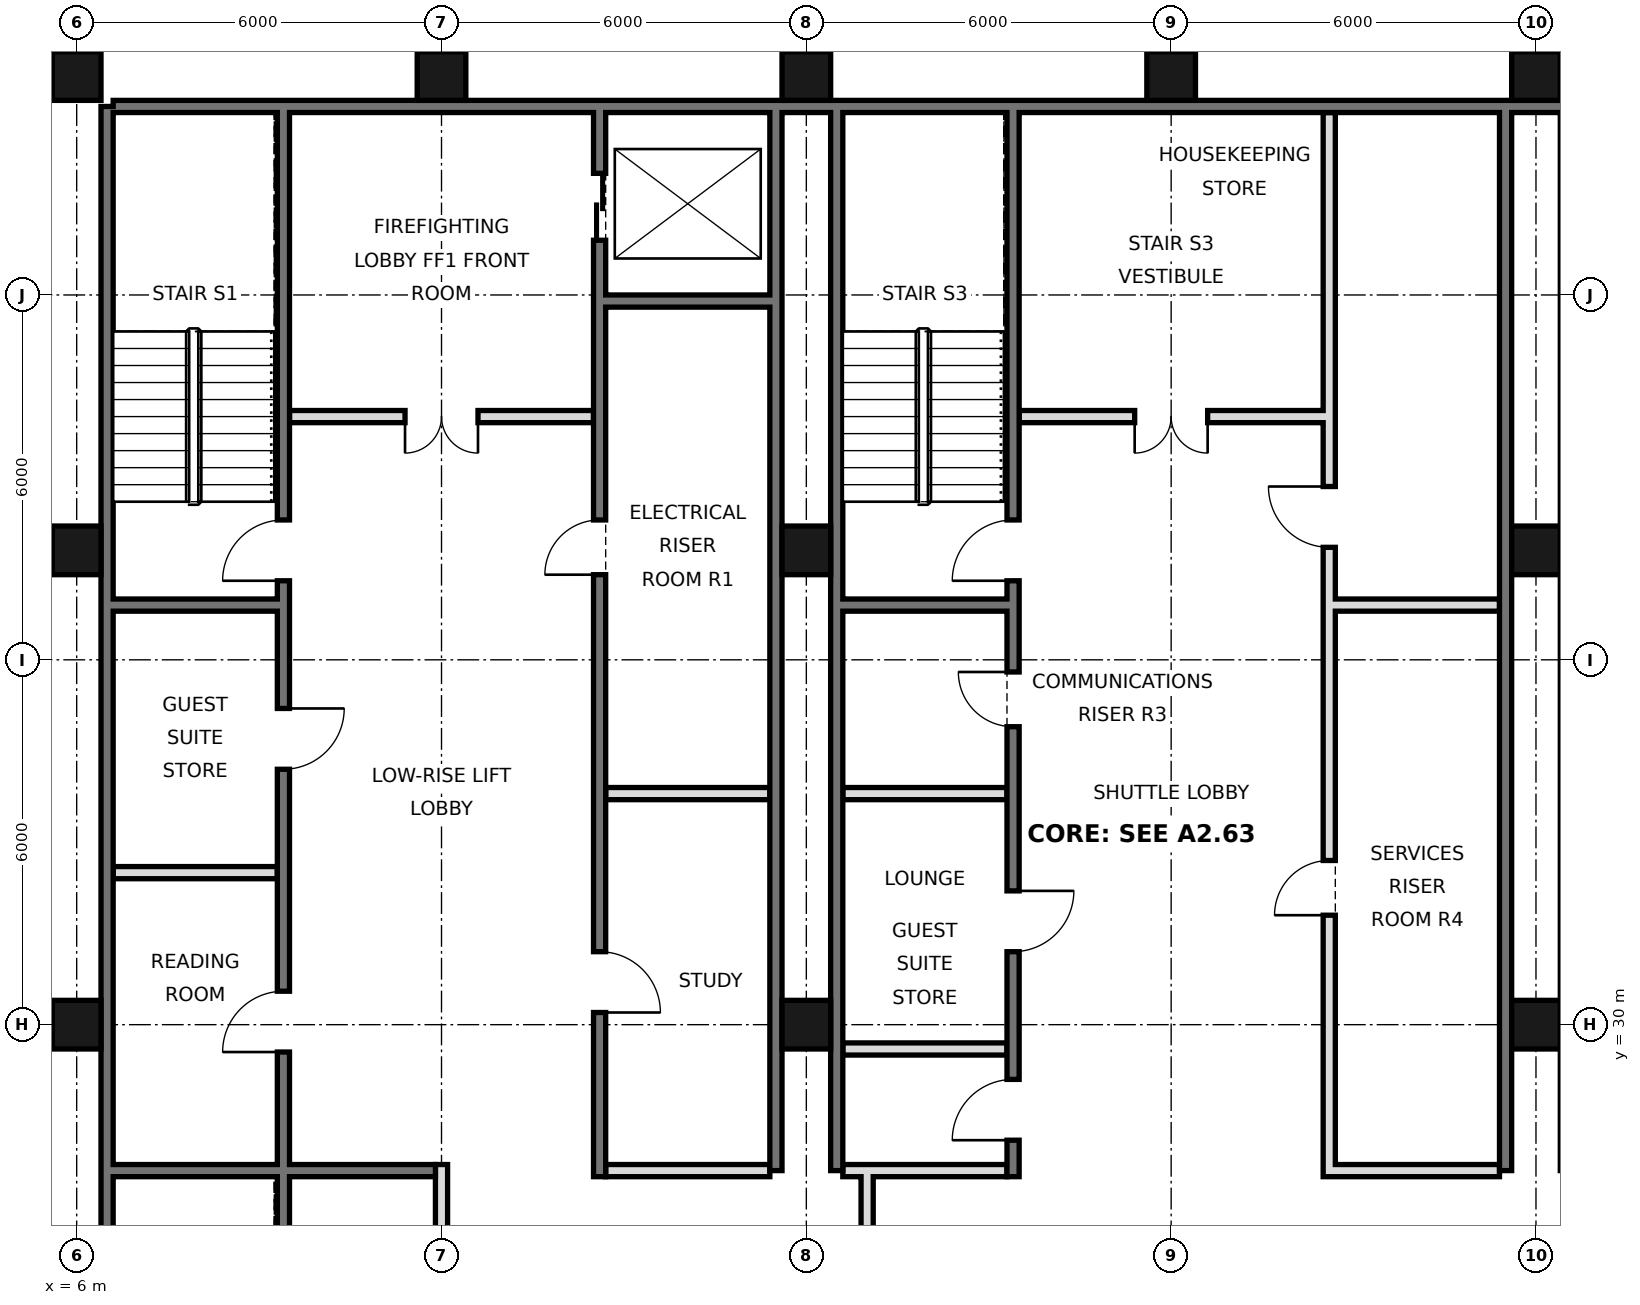
"""IFC4 building model, lengths in metres.
Left out: names, types, materials, properties, quantities, classifications, styles, units other than length and angle.
Written with IfcOpenShell. Run it as: python <this file> out.ifc"""

import sys

from ifc_helpers import new_model, si_unit, direction, frame, frame_2d, origin, origin_2d, place, context, subcontext, project, spatial, rectangle, hollow_rectangle, extrude, element, fill, save


model = new_model("IFC4")
c1 = context("Model", 3, precision=1e-05, world=origin(), true_north=direction((0.0, 1.0)))
c2 = subcontext(c1, "Body", "Model", "MODEL_VIEW")
j1 = project(units=[si_unit("LENGTHUNIT", "METRE"), si_unit("PLANEANGLEUNIT", "RADIAN")], contexts=[c1])
p1 = place(None, origin())
s1 = spatial("IfcSite", under=j1, at=p1, CompositionType="ELEMENT")
p2 = place(p1, origin())
s2 = spatial("IfcBuilding", under=s1, at=p2, CompositionType="ELEMENT")
p3 = place(p2, frame((0.0, 0.0, 250.4)))
s3 = spatial("IfcBuildingStorey", under=s2, at=p3, CompositionType="ELEMENT", Elevation=250.4)
for number, where, z_axis, x_axis in (
    (1, (6.0, 30.0, 0.0), (0.0, 0.0, 1.0), (1.0, 0.0, 0.0)),
    (2, (6.0, 37.8, 0.0), (0.0, 0.0, 1.0), (1.0, 0.0, 0.0)),
    (3, (6.0, 45.6, 0.0), (0.0, 0.0, 1.0), (1.0, 0.0, 0.0)),
    (4, (12.0, 45.6, 0.0), (0.0, 0.0, 1.0), (1.0, 0.0, 0.0)),
    (5, (18.0, 30.0, 0.0), (0.0, 0.0, 1.0), (1.0, 0.0, 0.0)),
    (6, (18.0, 37.8, 0.0), (0.0, 0.0, 1.0), (1.0, 0.0, 0.0)),
    (7, (18.0, 45.6, 0.0), (0.0, 0.0, 1.0), (1.0, 0.0, 0.0)),
    (8, (24.0, 45.6, 0.0), (0.0, 0.0, 1.0), (1.0, 0.0, 0.0)),
    (9, (30.0, 30.0, 0.0), (0.0, 0.0, 1.0), (1.0, 0.0, 0.0)),
    (10, (30.0, 37.8, 0.0), (0.0, 0.0, 1.0), (1.0, 0.0, 0.0)),
    (11, (30.0, 45.6, 0.0), (0.0, 0.0, 1.0), (1.0, 0.0, 0.0)),
):
    element("IfcColumn", number, at=place(p3, frame(where, z_axis=z_axis, x_axis=x_axis)), inside=s3, PredefinedType="COLUMN", context=c2, shape_type="SweptSolid", body=[
        extrude(hollow_rectangle(XDim=0.8, YDim=0.8, WallThickness=0.032, at=origin_2d()), origin(), (0.0, 0.0, 1.0), 3.6),
    ])
p4 = place(p3, frame((6.5, 21.6, 0.0), z_axis=(0.0, 0.0, 1.0), x_axis=(0.0, 1.0, 0.0)))
e12 = element("IfcWall", 12, at=p4, inside=s3, PredefinedType="SOLIDWALL", context=c2, shape_type="SweptSolid", body=[
    extrude(rectangle(XDim=23.5, YDim=0.2, at=frame_2d((11.75, 0.0))), origin(), (0.0, 0.0, 1.0), 3.42),
])
p5 = place(p3, frame((6.6, 45.1, 0.0), z_axis=(0.0, 0.0, 1.0), x_axis=(1.0, 0.0, 0.0)))
e13 = element("IfcWall", 13, at=p5, inside=s3, PredefinedType="SOLIDWALL", context=c2, shape_type="SweptSolid", body=[
    extrude(rectangle(XDim=34.8, YDim=0.2, at=frame_2d((17.4, 0.0))), origin(), (0.0, 0.0, 1.0), 3.42),
])
for number, where, z_axis, x_axis in (
    (14, (17.5, 27.6, 0.0), (0.0, 0.0, 1.0), (0.0, 1.0, 0.0)),
    (15, (18.5, 27.6, 0.0), (0.0, 0.0, 1.0), (0.0, 1.0, 0.0)),
    (16, (29.5, 27.6, 0.0), (0.0, 0.0, 1.0), (0.0, 1.0, 0.0)),
):
    element("IfcWall", number, at=place(p3, frame(where, z_axis=z_axis, x_axis=x_axis)), inside=s3, PredefinedType="SOLIDWALL", context=c2, shape_type="SweptSolid", body=[
        extrude(rectangle(XDim=17.5, YDim=0.2, at=frame_2d((8.75, 0.0))), origin(), (0.0, 0.0, 1.0), 3.42),
    ])
p6 = place(p3, frame((19.0, 21.6, 0.0), z_axis=(0.0, 0.0, 1.0), x_axis=(0.0, 1.0, 0.0)))
e17 = element("IfcWall", 17, at=p6, inside=s3, PredefinedType="PARTITIONING", context=c2, shape_type="SweptSolid", body=[
    extrude(rectangle(XDim=6.0, YDim=0.2, at=frame_2d((3.0, 0.0))), origin(), (0.0, 0.0, 1.0), 3.42),
])
p7 = place(p6, frame((2.1, 0.0, 0.0)))
e18 = element("IfcOpeningElement", 18, at=p7, cuts=e17, PredefinedType="OPENING", context=c2, shape_type="SweptSolid", body=[
    extrude(rectangle(XDim=1.8, YDim=2.1, at=frame_2d((0.9, 1.05))), frame((0.0, 0.11, 0.0), z_axis=(0.0, -1.0, 0.0), x_axis=(1.0, 0.0, 0.0)), (0.0, 0.0, 1.0), 0.22),
])
p8 = place(p3, frame((12.0, 21.6, 0.0), z_axis=(0.0, 0.0, 1.0), x_axis=(0.0, 1.0, 0.0)))
e19 = element("IfcWall", 19, at=p8, inside=s3, PredefinedType="PARTITIONING", context=c2, shape_type="SweptSolid", body=[
    extrude(rectangle(XDim=6.1, YDim=0.2, at=frame_2d((3.05, 0.0))), origin(), (0.0, 0.0, 1.0), 3.42),
])
p9 = place(p3, frame((14.6, 27.5, 0.0), z_axis=(0.0, 0.0, 1.0), x_axis=(0.0, 1.0, 0.0)))
e20 = element("IfcWall", 20, at=p9, inside=s3, PredefinedType="SOLIDWALL", context=c2, shape_type="SweptSolid", body=[
    extrude(rectangle(XDim=17.5, YDim=0.2, at=frame_2d((8.75, 0.0))), origin(), (0.0, 0.0, 1.0), 3.42),
])
p10 = place(p9, frame((15.4, 0.0, 0.0)))
e21 = element("IfcOpeningElement", 21, at=p10, cuts=e20, PredefinedType="OPENING", context=c2, shape_type="SweptSolid", body=[
    extrude(rectangle(XDim=1.1, YDim=2.1, at=frame_2d((0.55, 1.05))), frame((0.0, 0.11, 0.0), z_axis=(0.0, -1.0, 0.0), x_axis=(1.0, 0.0, 0.0)), (0.0, 0.0, 1.0), 0.22),
])
p11 = place(p9, frame((2.7, 0.0, 0.0)))
e22 = element("IfcOpeningElement", 22, at=p11, cuts=e20, PredefinedType="OPENING", context=c2, shape_type="SweptSolid", body=[
    extrude(rectangle(XDim=1.0, YDim=2.1, at=frame_2d((0.5, 1.05))), frame((0.0, 0.11, 0.0), z_axis=(0.0, -1.0, 0.0), x_axis=(1.0, 0.0, 0.0)), (0.0, 0.0, 1.0), 0.22),
])
p12 = place(p9, frame((9.9, 0.0, 0.0)))
e23 = element("IfcOpeningElement", 23, at=p12, cuts=e20, PredefinedType="OPENING", context=c2, shape_type="SweptSolid", body=[
    extrude(rectangle(XDim=0.9, YDim=2.1, at=frame_2d((0.45, 1.05))), frame((0.0, 0.11, 0.0), z_axis=(0.0, -1.0, 0.0), x_axis=(1.0, 0.0, 0.0)), (0.0, 0.0, 1.0), 0.22),
])
p13 = place(p3, frame((21.4, 27.5, 0.0), z_axis=(0.0, 0.0, 1.0), x_axis=(0.0, 1.0, 0.0)))
e24 = element("IfcWall", 24, at=p13, inside=s3, PredefinedType="SOLIDWALL", context=c2, shape_type="SweptSolid", body=[
    extrude(rectangle(XDim=17.5, YDim=0.2, at=frame_2d((8.75, 0.0))), origin(), (0.0, 0.0, 1.0), 3.42),
])
p14 = place(p13, frame((0.6, 0.0, 0.0)))
e25 = element("IfcOpeningElement", 25, at=p14, cuts=e24, PredefinedType="OPENING", context=c2, shape_type="SweptSolid", body=[
    extrude(rectangle(XDim=1.0, YDim=2.1, at=frame_2d((0.5, 1.05))), frame((0.0, 0.11, 0.0), z_axis=(0.0, -1.0, 0.0), x_axis=(1.0, 0.0, 0.0)), (0.0, 0.0, 1.0), 0.22),
])
p15 = place(p13, frame((3.7, 0.0, 0.0)))
e26 = element("IfcOpeningElement", 26, at=p15, cuts=e24, PredefinedType="OPENING", context=c2, shape_type="SweptSolid", body=[
    extrude(rectangle(XDim=1.0, YDim=2.1, at=frame_2d((0.5, 1.05))), frame((0.0, 0.11, 0.0), z_axis=(0.0, -1.0, 0.0), x_axis=(1.0, 0.0, 0.0)), (0.0, 0.0, 1.0), 0.22),
])
p16 = place(p13, frame((9.8, 0.0, 0.0)))
e27 = element("IfcOpeningElement", 27, at=p16, cuts=e24, PredefinedType="OPENING", context=c2, shape_type="SweptSolid", body=[
    extrude(rectangle(XDim=1.0, YDim=2.1, at=frame_2d((0.5, 1.05))), frame((0.0, 0.11, 0.0), z_axis=(0.0, -1.0, 0.0), x_axis=(1.0, 0.0, 0.0)), (0.0, 0.0, 1.0), 0.22),
])
p17 = place(p13, frame((7.4, 0.0, 0.0)))
e28 = element("IfcOpeningElement", 28, at=p17, cuts=e24, PredefinedType="OPENING", context=c2, shape_type="SweptSolid", body=[
    extrude(rectangle(XDim=0.9, YDim=2.1, at=frame_2d((0.45, 1.05))), frame((0.0, 0.11, 0.0), z_axis=(0.0, -1.0, 0.0), x_axis=(1.0, 0.0, 0.0)), (0.0, 0.0, 1.0), 0.22),
])
p18 = place(p3, frame((26.6, 27.5, 0.0), z_axis=(0.0, 0.0, 1.0), x_axis=(0.0, 1.0, 0.0)))
e29 = element("IfcWall", 29, at=p18, inside=s3, PredefinedType="SOLIDWALL", context=c2, shape_type="SweptSolid", body=[
    extrude(rectangle(XDim=17.5, YDim=0.2, at=frame_2d((8.75, 0.0))), origin(), (0.0, 0.0, 1.0), 3.42),
])
p19 = place(p18, frame((4.3, 0.0, 0.0)))
e30 = element("IfcOpeningElement", 30, at=p19, cuts=e29, PredefinedType="OPENING", context=c2, shape_type="SweptSolid", body=[
    extrude(rectangle(XDim=0.9, YDim=2.1, at=frame_2d((0.45, 1.05))), frame((0.0, 0.11, 0.0), z_axis=(0.0, -1.0, 0.0), x_axis=(1.0, 0.0, 0.0)), (0.0, 0.0, 1.0), 0.22),
])
p20 = place(p18, frame((10.35, 0.0, 0.0)))
e31 = element("IfcOpeningElement", 31, at=p20, cuts=e29, PredefinedType="OPENING", context=c2, shape_type="SweptSolid", body=[
    extrude(rectangle(XDim=1.0, YDim=2.1, at=frame_2d((0.5, 1.05))), frame((0.0, 0.11, 0.0), z_axis=(0.0, -1.0, 0.0), x_axis=(1.0, 0.0, 0.0)), (0.0, 0.0, 1.0), 0.22),
])
p21 = place(p3, frame((9.4, 21.6, 0.0), z_axis=(0.0, 0.0, 1.0), x_axis=(0.0, 1.0, 0.0)))
e32 = element("IfcWall", 32, at=p21, inside=s3, PredefinedType="SOLIDWALL", context=c2, shape_type="SweptSolid", body=[
    extrude(rectangle(XDim=23.4, YDim=0.2, at=frame_2d((11.7, 0.0))), origin(), (0.0, 0.0, 1.0), 3.42),
])
p22 = place(p21, frame((7.95, 0.0, 0.0)))
e33 = element("IfcOpeningElement", 33, at=p22, cuts=e32, PredefinedType="OPENING", context=c2, shape_type="SweptSolid", body=[
    extrude(rectangle(XDim=1.0, YDim=2.1, at=frame_2d((0.5, 1.05))), frame((0.0, 0.11, 0.0), z_axis=(0.0, -1.0, 0.0), x_axis=(1.0, 0.0, 0.0)), (0.0, 0.0, 1.0), 0.22),
])
p23 = place(p21, frame((12.6, 0.0, 0.0)))
e34 = element("IfcOpeningElement", 34, at=p23, cuts=e32, PredefinedType="OPENING", context=c2, shape_type="SweptSolid", body=[
    extrude(rectangle(XDim=1.0, YDim=2.1, at=frame_2d((0.5, 1.05))), frame((0.0, 0.11, 0.0), z_axis=(0.0, -1.0, 0.0), x_axis=(1.0, 0.0, 0.0)), (0.0, 0.0, 1.0), 0.22),
])
p24 = place(p21, frame((15.7, 0.0, 0.0)))
e35 = element("IfcOpeningElement", 35, at=p24, cuts=e32, PredefinedType="OPENING", context=c2, shape_type="SweptSolid", body=[
    extrude(rectangle(XDim=1.0, YDim=2.1, at=frame_2d((0.5, 1.05))), frame((0.0, 0.11, 0.0), z_axis=(0.0, -1.0, 0.0), x_axis=(1.0, 0.0, 0.0)), (0.0, 0.0, 1.0), 0.22),
])
p25 = place(p21, frame((0.175, 0.0, 0.0)))
e36 = element("IfcOpeningElement", 36, at=p25, cuts=e32, PredefinedType="OPENING", context=c2, shape_type="SweptSolid", body=[
    extrude(rectangle(XDim=0.9, YDim=2.1, at=frame_2d((0.45, 1.05))), frame((0.0, 0.11, 0.0), z_axis=(0.0, -1.0, 0.0), x_axis=(1.0, 0.0, 0.0)), (0.0, 0.0, 1.0), 0.22),
])
for number, where, z_axis, x_axis in (
    (37, (14.7, 27.6, 0.0), (0.0, 0.0, 1.0), (1.0, 0.0, 0.0)),
    (38, (18.6, 27.6, 0.0), (0.0, 0.0, 1.0), (1.0, 0.0, 0.0)),
):
    element("IfcWall", number, at=place(p3, frame(where, z_axis=z_axis, x_axis=x_axis)), inside=s3, PredefinedType="PARTITIONING", context=c2, shape_type="SweptSolid", body=[
        extrude(rectangle(XDim=2.7, YDim=0.2, at=frame_2d((1.35, 0.0))), origin(), (0.0, 0.0, 1.0), 3.42),
    ])
p26 = place(p3, frame((26.7, 27.6, 0.0), z_axis=(0.0, 0.0, 1.0), x_axis=(1.0, 0.0, 0.0)))
e39 = element("IfcWall", 39, at=p26, inside=s3, PredefinedType="SOLIDWALL", context=c2, shape_type="SweptSolid", body=[
    extrude(rectangle(XDim=2.7, YDim=0.2, at=frame_2d((1.35, 0.0))), origin(), (0.0, 0.0, 1.0), 3.42),
])
p27 = place(p3, frame((6.6, 27.6, 0.0), z_axis=(0.0, 0.0, 1.0), x_axis=(1.0, 0.0, 0.0)))
e40 = element("IfcWall", 40, at=p27, inside=s3, PredefinedType="SOLIDWALL", context=c2, shape_type="SweptSolid", body=[
    extrude(rectangle(XDim=5.3, YDim=0.2, at=frame_2d((2.65, 0.0))), origin(), (0.0, 0.0, 1.0), 3.42),
])
for number, where, z_axis, x_axis in (
    (41, (18.6, 29.6, 0.0), (0.0, 0.0, 1.0), (1.0, 0.0, 0.0)),
    (42, (6.6, 32.5, 0.0), (0.0, 0.0, 1.0), (1.0, 0.0, 0.0)),
):
    element("IfcWall", number, at=place(p3, frame(where, z_axis=z_axis, x_axis=x_axis)), inside=s3, PredefinedType="PARTITIONING", context=c2, shape_type="SweptSolid", body=[
        extrude(rectangle(XDim=2.7, YDim=0.2, at=frame_2d((1.35, 0.0))), origin(), (0.0, 0.0, 1.0), 3.42),
    ])
for number, where, z_axis, x_axis in (
    (43, (14.7, 33.8, 0.0), (0.0, 0.0, 1.0), (1.0, 0.0, 0.0)),
    (44, (18.6, 33.8, 0.0), (0.0, 0.0, 1.0), (1.0, 0.0, 0.0)),
    (45, (18.6, 36.9, 0.0), (0.0, 0.0, 1.0), (1.0, 0.0, 0.0)),
    (46, (26.7, 36.9, 0.0), (0.0, 0.0, 1.0), (1.0, 0.0, 0.0)),
    (47, (6.6, 36.9, 0.0), (0.0, 0.0, 1.0), (1.0, 0.0, 0.0)),
):
    element("IfcWall", number, at=place(p3, frame(where, z_axis=z_axis, x_axis=x_axis)), inside=s3, PredefinedType="SOLIDWALL", context=c2, shape_type="SweptSolid", body=[
        extrude(rectangle(XDim=2.7, YDim=0.2, at=frame_2d((1.35, 0.0))), origin(), (0.0, 0.0, 1.0), 3.42),
    ])
p28 = place(p3, frame((21.5, 40.0, 0.0), z_axis=(0.0, 0.0, 1.0), x_axis=(1.0, 0.0, 0.0)))
e48 = element("IfcWall", 48, at=p28, inside=s3, PredefinedType="PARTITIONING", context=c2, shape_type="SweptSolid", body=[
    extrude(rectangle(XDim=5.0, YDim=0.2, at=frame_2d((2.5, 0.0))), origin(), (0.0, 0.0, 1.0), 3.42),
])
p29 = place(p28, frame((1.9, 0.0, 0.0)))
e49 = element("IfcOpeningElement", 49, at=p29, cuts=e48, PredefinedType="OPENING", context=c2, shape_type="SweptSolid", body=[
    extrude(rectangle(XDim=1.2, YDim=2.1, at=frame_2d((0.6, 1.05))), frame((0.0, 0.11, 0.0), z_axis=(0.0, -1.0, 0.0), x_axis=(1.0, 0.0, 0.0)), (0.0, 0.0, 1.0), 0.22),
])
p30 = place(p3, frame((9.5, 40.0, 0.0), z_axis=(0.0, 0.0, 1.0), x_axis=(1.0, 0.0, 0.0)))
e50 = element("IfcWall", 50, at=p30, inside=s3, PredefinedType="PARTITIONING", context=c2, shape_type="SweptSolid", body=[
    extrude(rectangle(XDim=5.0, YDim=0.2, at=frame_2d((2.5, 0.0))), origin(), (0.0, 0.0, 1.0), 3.42),
])
p31 = place(p30, frame((1.9, 0.0, 0.0)))
e51 = element("IfcOpeningElement", 51, at=p31, cuts=e50, PredefinedType="OPENING", context=c2, shape_type="SweptSolid", body=[
    extrude(rectangle(XDim=1.2, YDim=2.1, at=frame_2d((0.6, 1.05))), frame((0.0, 0.11, 0.0), z_axis=(0.0, -1.0, 0.0), x_axis=(1.0, 0.0, 0.0)), (0.0, 0.0, 1.0), 0.22),
])
p32 = place(p3, frame((14.7, 41.9, 0.0), z_axis=(0.0, 0.0, 1.0), x_axis=(1.0, 0.0, 0.0)))
e52 = element("IfcWall", 52, at=p32, inside=s3, PredefinedType="SOLIDWALL", context=c2, shape_type="SweptSolid", body=[
    extrude(rectangle(XDim=2.7, YDim=0.2, at=frame_2d((1.35, 0.0))), origin(), (0.0, 0.0, 1.0), 3.42),
])
p33 = place(p31, frame((1.2, 0.0, 0.0), z_axis=(0.0, 0.0, 1.0), x_axis=(-1.0, 0.0, 0.0)))
e53 = element("IfcDoor", 53, at=p33, inside=s3, OperationType="DOUBLE_DOOR_SINGLE_SWING", PredefinedType="DOOR", context=c2, shape_type="SweptSolid", body=[
    extrude(rectangle(XDim=1.2, YDim=2.1, at=frame_2d((0.6, 1.05))), frame((0.0, 0.025, 0.0), z_axis=(0.0, -1.0, 0.0), x_axis=(1.0, 0.0, 0.0)), (0.0, 0.0, 1.0), 0.05),
])
fill(e51, e53)
p34 = place(p29, frame((1.2, 0.0, 0.0), z_axis=(0.0, 0.0, 1.0), x_axis=(-1.0, 0.0, 0.0)))
e54 = element("IfcDoor", 54, at=p34, inside=s3, OperationType="DOUBLE_DOOR_SINGLE_SWING", PredefinedType="DOOR", context=c2, shape_type="SweptSolid", body=[
    extrude(rectangle(XDim=1.2, YDim=2.1, at=frame_2d((0.6, 1.05))), frame((0.0, 0.025, 0.0), z_axis=(0.0, -1.0, 0.0), x_axis=(1.0, 0.0, 0.0)), (0.0, 0.0, 1.0), 0.05),
])
fill(e49, e54)
p35 = place(p10, origin())
e55 = element("IfcDoor", 55, at=p35, inside=s3, OperationType="DOUBLE_DOOR_SLIDING", PredefinedType="DOOR", context=c2, shape_type="SweptSolid", body=[
    extrude(rectangle(XDim=1.1, YDim=2.1, at=frame_2d((0.55, 1.05))), frame((0.0, 0.025, 0.0), z_axis=(0.0, -1.0, 0.0), x_axis=(1.0, 0.0, 0.0)), (0.0, 0.0, 1.0), 0.05),
])
fill(e21, e55)
p36 = place(p14, origin())
e56 = element("IfcDoor", 56, at=p36, inside=s3, OperationType="SINGLE_SWING_LEFT", PredefinedType="DOOR", context=c2, shape_type="SweptSolid", body=[
    extrude(rectangle(XDim=1.0, YDim=2.1, at=frame_2d((0.5, 1.05))), frame((0.0, 0.025, 0.0), z_axis=(0.0, -1.0, 0.0), x_axis=(1.0, 0.0, 0.0)), (0.0, 0.0, 1.0), 0.05),
])
fill(e25, e56)
p37 = place(p15, origin())
e57 = element("IfcDoor", 57, at=p37, inside=s3, OperationType="SINGLE_SWING_RIGHT", PredefinedType="DOOR", context=c2, shape_type="SweptSolid", body=[
    extrude(rectangle(XDim=1.0, YDim=2.1, at=frame_2d((0.5, 1.05))), frame((0.0, 0.025, 0.0), z_axis=(0.0, -1.0, 0.0), x_axis=(1.0, 0.0, 0.0)), (0.0, 0.0, 1.0), 0.05),
])
fill(e26, e57)
p38 = place(p11, frame((1.0, 0.0, 0.0), z_axis=(0.0, 0.0, 1.0), x_axis=(-1.0, 0.0, 0.0)))
e58 = element("IfcDoor", 58, at=p38, inside=s3, OperationType="SINGLE_SWING_RIGHT", PredefinedType="DOOR", context=c2, shape_type="SweptSolid", body=[
    extrude(rectangle(XDim=1.0, YDim=2.1, at=frame_2d((0.5, 1.05))), frame((0.0, 0.025, 0.0), z_axis=(0.0, -1.0, 0.0), x_axis=(1.0, 0.0, 0.0)), (0.0, 0.0, 1.0), 0.05),
])
fill(e22, e58)
p39 = place(p22, origin())
e59 = element("IfcDoor", 59, at=p39, inside=s3, OperationType="SINGLE_SWING_LEFT", PredefinedType="DOOR", context=c2, shape_type="SweptSolid", body=[
    extrude(rectangle(XDim=1.0, YDim=2.1, at=frame_2d((0.5, 1.05))), frame((0.0, 0.025, 0.0), z_axis=(0.0, -1.0, 0.0), x_axis=(1.0, 0.0, 0.0)), (0.0, 0.0, 1.0), 0.05),
])
fill(e33, e59)
p40 = place(p23, origin())
e60 = element("IfcDoor", 60, at=p40, inside=s3, OperationType="SINGLE_SWING_RIGHT", PredefinedType="DOOR", context=c2, shape_type="SweptSolid", body=[
    extrude(rectangle(XDim=1.0, YDim=2.1, at=frame_2d((0.5, 1.05))), frame((0.0, 0.025, 0.0), z_axis=(0.0, -1.0, 0.0), x_axis=(1.0, 0.0, 0.0)), (0.0, 0.0, 1.0), 0.05),
])
fill(e34, e60)
p41 = place(p24, origin())
e61 = element("IfcDoor", 61, at=p41, inside=s3, OperationType="SINGLE_SWING_LEFT", PredefinedType="DOOR", context=c2, shape_type="SweptSolid", body=[
    extrude(rectangle(XDim=1.0, YDim=2.1, at=frame_2d((0.5, 1.05))), frame((0.0, 0.025, 0.0), z_axis=(0.0, -1.0, 0.0), x_axis=(1.0, 0.0, 0.0)), (0.0, 0.0, 1.0), 0.05),
])
fill(e35, e61)
p42 = place(p16, origin())
e62 = element("IfcDoor", 62, at=p42, inside=s3, OperationType="SINGLE_SWING_LEFT", PredefinedType="DOOR", context=c2, shape_type="SweptSolid", body=[
    extrude(rectangle(XDim=1.0, YDim=2.1, at=frame_2d((0.5, 1.05))), frame((0.0, 0.025, 0.0), z_axis=(0.0, -1.0, 0.0), x_axis=(1.0, 0.0, 0.0)), (0.0, 0.0, 1.0), 0.05),
])
fill(e27, e62)
p43 = place(p12, origin())
e63 = element("IfcDoor", 63, at=p43, inside=s3, OperationType="SINGLE_SWING_LEFT", PredefinedType="DOOR", context=c2, shape_type="SweptSolid", body=[
    extrude(rectangle(XDim=0.9, YDim=2.1, at=frame_2d((0.45, 1.05))), frame((0.0, 0.025, 0.0), z_axis=(0.0, -1.0, 0.0), x_axis=(1.0, 0.0, 0.0)), (0.0, 0.0, 1.0), 0.05),
])
fill(e23, e63)
p44 = place(p17, frame((0.9, 0.0, 0.0), z_axis=(0.0, 0.0, 1.0), x_axis=(-1.0, 0.0, 0.0)))
e64 = element("IfcDoor", 64, at=p44, inside=s3, OperationType="SINGLE_SWING_LEFT", PredefinedType="DOOR", context=c2, shape_type="SweptSolid", body=[
    extrude(rectangle(XDim=0.9, YDim=2.1, at=frame_2d((0.45, 1.05))), frame((0.0, 0.025, 0.0), z_axis=(0.0, -1.0, 0.0), x_axis=(1.0, 0.0, 0.0)), (0.0, 0.0, 1.0), 0.05),
])
fill(e28, e64)
p45 = place(p19, origin())
e65 = element("IfcDoor", 65, at=p45, inside=s3, OperationType="SINGLE_SWING_LEFT", PredefinedType="DOOR", context=c2, shape_type="SweptSolid", body=[
    extrude(rectangle(XDim=0.9, YDim=2.1, at=frame_2d((0.45, 1.05))), frame((0.0, 0.025, 0.0), z_axis=(0.0, -1.0, 0.0), x_axis=(1.0, 0.0, 0.0)), (0.0, 0.0, 1.0), 0.05),
])
fill(e30, e65)
p46 = place(p20, frame((1.0, 0.0, 0.0), z_axis=(0.0, 0.0, 1.0), x_axis=(-1.0, 0.0, 0.0)))
e66 = element("IfcDoor", 66, at=p46, inside=s3, OperationType="SINGLE_SWING_LEFT", PredefinedType="DOOR", context=c2, shape_type="SweptSolid", body=[
    extrude(rectangle(XDim=1.0, YDim=2.1, at=frame_2d((0.5, 1.05))), frame((0.0, 0.025, 0.0), z_axis=(0.0, -1.0, 0.0), x_axis=(1.0, 0.0, 0.0)), (0.0, 0.0, 1.0), 0.05),
])
fill(e31, e66)
save(model, sys.argv[1])
